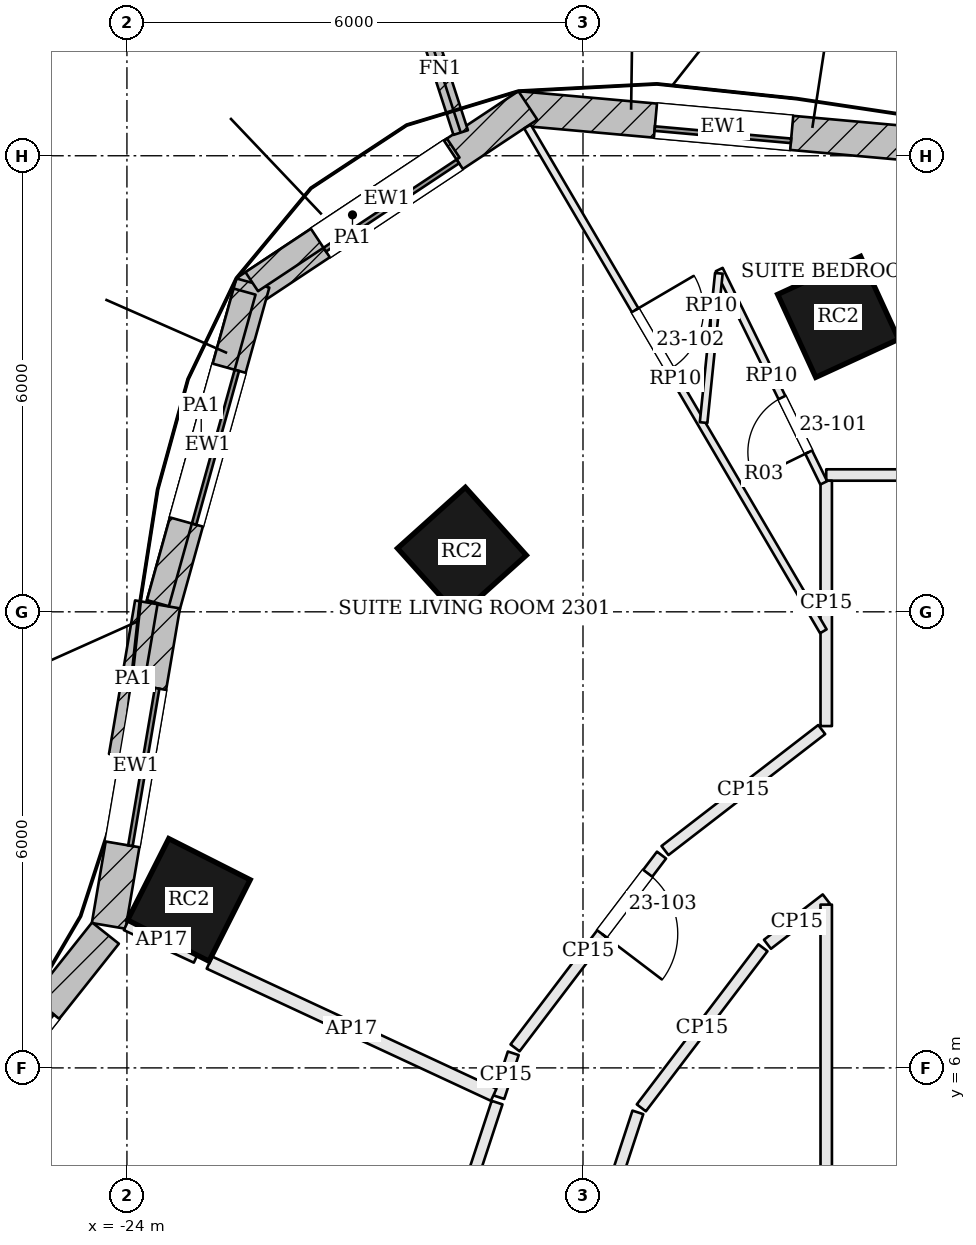
"""IFC4 building model, lengths in metres.
Left out: names, types, materials, properties, quantities, classifications, styles, units other than length and angle.
Written with IfcOpenShell. Run it as: python <this file> out.ifc"""

import sys

from ifc_helpers import new_model, si_unit, direction, frame, frame_2d, origin, origin_2d, place, context, subcontext, project, spatial, rectangle, extrude, element, fill, save


model = new_model("IFC4")
c1 = context("Model", 3, precision=1e-05, world=origin(), true_north=direction((0.0, 1.0)))
c2 = subcontext(c1, "Body", "Model", "MODEL_VIEW")
j1 = project(units=[si_unit("LENGTHUNIT", "METRE"), si_unit("PLANEANGLEUNIT", "RADIAN")], contexts=[c1])
p1 = place(None, origin())
s1 = spatial("IfcSite", under=j1, at=p1, CompositionType="ELEMENT")
p2 = place(p1, origin())
s2 = spatial("IfcBuilding", under=s1, at=p2, CompositionType="ELEMENT")
p3 = place(p2, frame((0.0, 0.0, 99.6)))
s3 = spatial("IfcBuildingStorey", under=s2, at=p3, CompositionType="ELEMENT", Elevation=99.6)
for number, where, z_axis, x_axis in (
    (1, (-14.643, 15.881, 0.0), (0.0, 0.0, 1.0), (-0.909, -0.417, 0.0)),
    (2, (-19.593, 12.79, 0.0), (0.0, 0.0, 1.0), (-0.744, -0.668, 0.0)),
    (3, (-23.185, 8.21, 0.0), (0.0, 0.0, 1.0), (-0.451, -0.893, 0.0)),
):
    element("IfcColumn", number, at=place(p3, frame(where, z_axis=z_axis, x_axis=x_axis)), inside=s3, PredefinedType="COLUMN", context=c2, shape_type="SweptSolid", body=[
        extrude(rectangle(XDim=1.2, YDim=1.2, at=origin_2d()), origin(), (0.0, 0.0, 1.0), 3.6),
    ])
p4 = place(p3, frame((-13.436, 18.138, 0.0), z_axis=(0.0, 0.0, 1.0), x_axis=(-0.99598810213, 0.089485755376, 0.0)))
e4 = element("IfcWall", 4, at=p4, inside=s3, PredefinedType="SOLIDWALL", context=c2, shape_type="SweptSolid", body=[
    extrude(rectangle(XDim=5.451, YDim=0.45, at=frame_2d((2.726, 0.0))), origin(), (0.0, 0.0, 1.0), 3.4),
])
p5 = place(p4, frame((1.825, 0.0, 0.9)))
e5 = element("IfcOpeningElement", 5, at=p5, cuts=e4, PredefinedType="OPENING", context=c2, shape_type="SweptSolid", body=[
    extrude(rectangle(XDim=1.8, YDim=2.0, at=frame_2d((0.9, 1.0))), frame((0.0, 0.235, 0.0), z_axis=(0.0, -1.0, 0.0), x_axis=(1.0, 0.0, 0.0)), (0.0, 0.0, 1.0), 0.47),
])
p6 = place(p3, frame((-18.726, 18.663, 0.0), z_axis=(0.0, 0.0, 1.0), x_axis=(-0.83333921474, -0.552761931736, 0.0)))
e6 = element("IfcWall", 6, at=p6, inside=s3, PredefinedType="SOLIDWALL", context=c2, shape_type="SweptSolid", body=[
    extrude(rectangle(XDim=4.451, YDim=0.45, at=frame_2d((2.225, 0.0))), origin(), (0.0, 0.0, 1.0), 3.4),
])
p7 = place(p6, frame((1.175, 0.0, 0.9)))
e7 = element("IfcOpeningElement", 7, at=p7, cuts=e6, PredefinedType="OPENING", context=c2, shape_type="SweptSolid", body=[
    extrude(rectangle(XDim=2.1, YDim=2.0, at=frame_2d((1.05, 1.0))), frame((0.0, 0.235, 0.0), z_axis=(0.0, -1.0, 0.0), x_axis=(1.0, 0.0, 0.0)), (0.0, 0.0, 1.0), 0.47),
])
p8 = place(p3, frame((-22.344, 16.326, 0.0), z_axis=(0.0, 0.0, 1.0), x_axis=(-0.267925456304, -0.963439645159, 0.0)))
e8 = element("IfcWall", 8, at=p8, inside=s3, PredefinedType="SOLIDWALL", context=c2, shape_type="SweptSolid", body=[
    extrude(rectangle(XDim=4.427, YDim=0.45, at=frame_2d((2.213, 0.0))), origin(), (0.0, 0.0, 1.0), 3.4),
])
p9 = place(p8, frame((1.164, 0.0, 0.9)))
e9 = element("IfcOpeningElement", 9, at=p9, cuts=e8, PredefinedType="OPENING", context=c2, shape_type="SweptSolid", body=[
    extrude(rectangle(XDim=2.1, YDim=2.0, at=frame_2d((1.05, 1.0))), frame((0.0, 0.235, 0.0), z_axis=(0.0, -1.0, 0.0), x_axis=(1.0, 0.0, 0.0)), (0.0, 0.0, 1.0), 0.47),
])
p10 = place(p3, frame((-23.524, 12.083, 0.0), z_axis=(0.0, 0.0, 1.0), x_axis=(-0.167445072349, -0.985881406532, 0.0)))
e10 = element("IfcWall", 10, at=p10, inside=s3, PredefinedType="SOLIDWALL", context=c2, shape_type="SweptSolid", body=[
    extrude(rectangle(XDim=4.275, YDim=0.45, at=frame_2d((2.137, 0.0))), origin(), (0.0, 0.0, 1.0), 3.4),
])
p11 = place(p10, frame((1.087, 0.0, 0.9)))
e11 = element("IfcOpeningElement", 11, at=p11, cuts=e10, PredefinedType="OPENING", context=c2, shape_type="SweptSolid", body=[
    extrude(rectangle(XDim=2.1, YDim=2.0, at=frame_2d((1.05, 1.0))), frame((0.0, 0.235, 0.0), z_axis=(0.0, -1.0, 0.0), x_axis=(1.0, 0.0, 0.0)), (0.0, 0.0, 1.0), 0.47),
])
p12 = place(p3, frame((-24.282, 7.774, 0.0), z_axis=(0.0, 0.0, 1.0), x_axis=(-0.621735490397, -0.783227285008, 0.0)))
e12 = element("IfcWall", 12, at=p12, inside=s3, PredefinedType="SOLIDWALL", context=c2, shape_type="SweptSolid", body=[
    extrude(rectangle(XDim=4.625, YDim=0.45, at=frame_2d((2.312, 0.0))), origin(), (0.0, 0.0, 1.0), 3.4),
])
p13 = place(p12, frame((1.262, 0.0, 0.9)))
e13 = element("IfcOpeningElement", 13, at=p13, cuts=e12, PredefinedType="OPENING", context=c2, shape_type="SweptSolid", body=[
    extrude(rectangle(XDim=2.1, YDim=2.0, at=frame_2d((1.05, 1.0))), frame((0.0, 0.235, 0.0), z_axis=(0.0, -1.0, 0.0), x_axis=(1.0, 0.0, 0.0)), (0.0, 0.0, 1.0), 0.47),
])
p14 = place(p3, frame((-19.609, 18.305, 0.0), z_axis=(0.0, 0.0, 1.0), x_axis=(-0.308600224758, 0.951191832008, 0.0)))
e14 = element("IfcWall", 14, at=p14, inside=s3, PredefinedType="SOLIDWALL", context=c2, shape_type="SweptSolid", body=[
    extrude(rectangle(XDim=1.75, YDim=0.2, at=frame_2d((0.875, 0.0))), origin(), (0.0, 0.0, 1.0), 3.4),
])
p15 = place(p3, frame((-19.708, 18.101, 3.6), z_axis=(0.0, 0.0, 1.0), x_axis=(-0.833370664286, -0.552714515738, 0.0)))
e15 = element("IfcWall", 15, at=p15, inside=s3, PredefinedType="PARAPET", context=c2, shape_type="SweptSolid", body=[
    extrude(rectangle(XDim=3.18, YDim=0.3, at=frame_2d((1.59, 0.0))), origin(), (0.0, 0.0, 1.0), 1.1),
])
p16 = place(p3, frame((-22.452, 16.213, 3.6), z_axis=(0.0, 0.0, 1.0), x_axis=(-0.267993020858, -0.963420853403, 0.0)))
e16 = element("IfcWall", 16, at=p16, inside=s3, PredefinedType="PARAPET", context=c2, shape_type="SweptSolid", body=[
    extrude(rectangle(XDim=4.255, YDim=0.3, at=frame_2d((2.128, 0.0))), origin(), (0.0, 0.0, 1.0), 1.1),
])
p17 = place(p3, frame((-23.745, 12.125, 3.6), z_axis=(0.0, 0.0, 1.0), x_axis=(-0.16743218322, -0.985883595574, 0.0)))
e17 = element("IfcWall", 17, at=p17, inside=s3, PredefinedType="PARAPET", context=c2, shape_type="SweptSolid", body=[
    extrude(rectangle(XDim=2.049, YDim=0.3, at=frame_2d((1.024, 0.0))), origin(), (0.0, 0.0, 1.0), 1.1),
])
p18 = place(p3, frame((-12.018, 13.8, 0.0), z_axis=(0.0, 0.0, 1.0), x_axis=(-1.0, 0.0, 0.0)))
e18 = element("IfcWall", 18, at=p18, inside=s3, PredefinedType="PARTITIONING", context=c2, shape_type="SweptSolid", body=[
    extrude(rectangle(XDim=2.782, YDim=0.15, at=frame_2d((1.391, 0.0))), origin(), (0.0, 0.0, 1.0), 2.784),
])
p19 = place(p3, frame((-14.8, 13.725, 0.0), z_axis=(0.0, 0.0, 1.0), x_axis=(0.0, -1.0, 0.0)))
e19 = element("IfcWall", 19, at=p19, inside=s3, PredefinedType="PARTITIONING", context=c2, shape_type="SweptSolid", body=[
    extrude(rectangle(XDim=3.228, YDim=0.15, at=frame_2d((1.614, 0.0))), origin(), (0.0, 0.0, 1.0), 2.784),
])
p20 = place(p3, frame((-14.86, 10.451, 0.0), z_axis=(0.0, 0.0, 1.0), x_axis=(-0.791542595332, -0.611113999001, 0.0)))
e20 = element("IfcWall", 20, at=p20, inside=s3, PredefinedType="PARTITIONING", context=c2, shape_type="SweptSolid", body=[
    extrude(rectangle(XDim=2.605, YDim=0.15, at=frame_2d((1.302, 0.0))), origin(), (0.0, 0.0, 1.0), 2.784),
])
p21 = place(p3, frame((-16.967, 8.8, 0.0), z_axis=(0.0, 0.0, 1.0), x_axis=(-0.604991921991, -0.796231608469, 0.0)))
e21 = element("IfcWall", 21, at=p21, inside=s3, PredefinedType="PARTITIONING", context=c2, shape_type="SweptSolid", body=[
    extrude(rectangle(XDim=3.185, YDim=0.15, at=frame_2d((1.593, 0.0))), origin(), (0.0, 0.0, 1.0), 2.784),
])
p22 = place(p21, frame((0.3, 0.0, 0.0)))
e22 = element("IfcOpeningElement", 22, at=p22, cuts=e21, PredefinedType="OPENING", context=c2, shape_type="SweptSolid", body=[
    extrude(rectangle(XDim=1.0, YDim=2.1, at=frame_2d((0.5, 1.05))), frame((0.0, 0.085, 0.0), z_axis=(0.0, -1.0, 0.0), x_axis=(1.0, 0.0, 0.0)), (0.0, 0.0, 1.0), 0.17),
])
p23 = place(p3, frame((-18.917, 6.192, 0.0), z_axis=(0.0, 0.0, 1.0), x_axis=(-0.312127391281, -0.95004025789, 0.0)))
e23 = element("IfcWall", 23, at=p23, inside=s3, PredefinedType="PARTITIONING", context=c2, shape_type="SweptSolid", body=[
    extrude(rectangle(XDim=0.608, YDim=0.15, at=frame_2d((0.304, 0.0))), origin(), (0.0, 0.0, 1.0), 2.784),
])
p24 = place(p3, frame((-24.004, 7.892, 0.0), z_axis=(0.0, 0.0, 1.0), x_axis=(0.906808768869, -0.421542235966, 0.0)))
e24 = element("IfcWall", 24, at=p24, inside=s3, PredefinedType="PARTITIONING", context=c2, shape_type="SweptSolid", body=[
    extrude(rectangle(XDim=1.015, YDim=0.175, at=frame_2d((0.508, 0.0))), origin(), (0.0, 0.0, 1.0), 2.784),
])
p25 = place(p3, frame((-22.914, 7.385, 0.0), z_axis=(0.0, 0.0, 1.0), x_axis=(0.906751124929, -0.421666215674, 0.0)))
e25 = element("IfcWall", 25, at=p25, inside=s3, PredefinedType="PARTITIONING", context=c2, shape_type="SweptSolid", body=[
    extrude(rectangle(XDim=4.123, YDim=0.175, at=frame_2d((2.062, 0.0))), origin(), (0.0, 0.0, 1.0), 2.784),
])
p26 = place(p3, frame((-19.13, 5.543, 0.0), z_axis=(0.0, 0.0, 1.0), x_axis=(-0.312063251121, -0.950061328178, 0.0)))
e26 = element("IfcWall", 26, at=p26, inside=s3, PredefinedType="PARTITIONING", context=c2, shape_type="SweptSolid", body=[
    extrude(rectangle(XDim=2.587, YDim=0.15, at=frame_2d((1.293, 0.0))), origin(), (0.0, 0.0, 1.0), 2.784),
])
p27 = place(p3, frame((-18.134, 2.809, 0.0), z_axis=(0.0, 0.0, 1.0), x_axis=(0.312005223814, 0.950080386237, 0.0)))
e27 = element("IfcWall", 27, at=p27, inside=s3, PredefinedType="PARTITIONING", context=c2, shape_type="SweptSolid", body=[
    extrude(rectangle(XDim=2.743, YDim=0.15, at=frame_2d((1.371, 0.0))), origin(), (0.0, 0.0, 1.0), 2.784),
])
p28 = place(p3, frame((-17.233, 5.475, 0.0), z_axis=(0.0, 0.0, 1.0), x_axis=(0.605024750549, 0.796206663639, 0.0)))
e28 = element("IfcWall", 28, at=p28, inside=s3, PredefinedType="PARTITIONING", context=c2, shape_type="SweptSolid", body=[
    extrude(rectangle(XDim=2.645, YDim=0.15, at=frame_2d((1.322, 0.0))), origin(), (0.0, 0.0, 1.0), 2.784),
])
p29 = place(p3, frame((-15.573, 7.626, 0.0), z_axis=(0.0, 0.0, 1.0), x_axis=(0.791581834002, 0.611063171921, 0.0)))
e29 = element("IfcWall", 29, at=p29, inside=s3, PredefinedType="PARTITIONING", context=c2, shape_type="SweptSolid", body=[
    extrude(rectangle(XDim=0.977, YDim=0.15, at=frame_2d((0.488, 0.0))), origin(), (0.0, 0.0, 1.0), 2.784),
])
p30 = place(p3, frame((-14.8, 8.148, 0.0), z_axis=(0.0, 0.0, 1.0), x_axis=(0.0, -1.0, 0.0)))
e30 = element("IfcWall", 30, at=p30, inside=s3, PredefinedType="PARTITIONING", context=c2, shape_type="SweptSolid", body=[
    extrude(rectangle(XDim=12.948, YDim=0.15, at=frame_2d((6.474, 0.0))), origin(), (0.0, 0.0, 1.0), 2.784),
])
p31 = place(p30, frame((5.536, 0.0, 0.0)))
e31 = element("IfcOpeningElement", 31, at=p31, cuts=e30, PredefinedType="OPENING", context=c2, shape_type="SweptSolid", body=[
    extrude(rectangle(XDim=1.8, YDim=2.1, at=frame_2d((0.9, 1.05))), frame((0.0, 0.085, 0.0), z_axis=(0.0, -1.0, 0.0), x_axis=(1.0, 0.0, 0.0)), (0.0, 0.0, 1.0), 0.17),
])
p32 = place(p3, frame((-18.73, 18.384, 0.0), z_axis=(0.0, 0.0, 1.0), x_axis=(0.505731710935, -0.862690811679, 0.0)))
e32 = element("IfcWall", 32, at=p32, inside=s3, PredefinedType="PARTITIONING", context=c2, shape_type="SweptSolid", body=[
    extrude(rectangle(XDim=7.697, YDim=0.1, at=frame_2d((3.848, 0.0))), origin(), (0.0, 0.0, 1.0), 2.784),
])
p33 = place(p32, frame((2.8, 0.0, 0.0)))
e33 = element("IfcOpeningElement", 33, at=p33, cuts=e32, PredefinedType="OPENING", context=c2, shape_type="SweptSolid", body=[
    extrude(rectangle(XDim=0.9, YDim=2.4, at=frame_2d((0.45, 1.2))), frame((0.0, 0.06, 0.0), z_axis=(0.0, -1.0, 0.0), x_axis=(1.0, 0.0, 0.0)), (0.0, 0.0, 1.0), 0.12),
])
p34 = place(p3, frame((-14.833, 13.697, 0.0), z_axis=(0.0, 0.0, 1.0), x_axis=(-0.439854589446, 0.898069006337, 0.0)))
e34 = element("IfcWall", 34, at=p34, inside=s3, PredefinedType="PARTITIONING", context=c2, shape_type="SweptSolid", body=[
    extrude(rectangle(XDim=3.125, YDim=0.1, at=frame_2d((1.562, 0.0))), origin(), (0.0, 0.0, 1.0), 2.784),
])
p35 = place(p34, frame((0.45, 0.0, 0.0)))
e35 = element("IfcOpeningElement", 35, at=p35, cuts=e34, PredefinedType="OPENING", context=c2, shape_type="SweptSolid", body=[
    extrude(rectangle(XDim=0.8, YDim=2.1, at=frame_2d((0.4, 1.05))), frame((0.0, 0.06, 0.0), z_axis=(0.0, -1.0, 0.0), x_axis=(1.0, 0.0, 0.0)), (0.0, 0.0, 1.0), 0.12),
])
p36 = place(p3, frame((-16.213, 16.453, 0.0), z_axis=(0.0, 0.0, 1.0), x_axis=(-0.101658565937, -0.99481934841, 0.0)))
e36 = element("IfcWall", 36, at=p36, inside=s3, PredefinedType="PARTITIONING", context=c2, shape_type="SweptSolid", body=[
    extrude(rectangle(XDim=1.974, YDim=0.1, at=frame_2d((0.987, 0.0))), origin(), (0.0, 0.0, 1.0), 2.784),
])
p37 = place(p5, origin())
e37 = element("IfcWindow", 37, at=p37, inside=s3, PartitioningType="SINGLE_PANEL", PredefinedType="WINDOW", context=c2, shape_type="SweptSolid", body=[
    extrude(rectangle(XDim=1.8, YDim=2.0, at=frame_2d((0.9, 1.0))), frame((0.0, 0.135, 0.0), z_axis=(0.0, -1.0, 0.0), x_axis=(1.0, 0.0, 0.0)), (0.0, 0.0, 1.0), 0.06),
])
fill(e5, e37)
p38 = place(p7, origin())
e38 = element("IfcWindow", 38, at=p38, inside=s3, PartitioningType="SINGLE_PANEL", PredefinedType="WINDOW", context=c2, shape_type="SweptSolid", body=[
    extrude(rectangle(XDim=2.1, YDim=2.0, at=frame_2d((1.05, 1.0))), frame((0.0, 0.135, 0.0), z_axis=(0.0, -1.0, 0.0), x_axis=(1.0, 0.0, 0.0)), (0.0, 0.0, 1.0), 0.06),
])
fill(e7, e38)
p39 = place(p9, origin())
e39 = element("IfcWindow", 39, at=p39, inside=s3, PartitioningType="SINGLE_PANEL", PredefinedType="WINDOW", context=c2, shape_type="SweptSolid", body=[
    extrude(rectangle(XDim=2.1, YDim=2.0, at=frame_2d((1.05, 1.0))), frame((0.0, 0.135, 0.0), z_axis=(0.0, -1.0, 0.0), x_axis=(1.0, 0.0, 0.0)), (0.0, 0.0, 1.0), 0.06),
])
fill(e9, e39)
p40 = place(p11, origin())
e40 = element("IfcWindow", 40, at=p40, inside=s3, PartitioningType="SINGLE_PANEL", PredefinedType="WINDOW", context=c2, shape_type="SweptSolid", body=[
    extrude(rectangle(XDim=2.1, YDim=2.0, at=frame_2d((1.05, 1.0))), frame((0.0, 0.135, 0.0), z_axis=(0.0, -1.0, 0.0), x_axis=(1.0, 0.0, 0.0)), (0.0, 0.0, 1.0), 0.06),
])
fill(e11, e40)
p41 = place(p13, origin())
e41 = element("IfcWindow", 41, at=p41, inside=s3, PartitioningType="SINGLE_PANEL", PredefinedType="WINDOW", context=c2, shape_type="SweptSolid", body=[
    extrude(rectangle(XDim=2.1, YDim=2.0, at=frame_2d((1.05, 1.0))), frame((0.0, 0.135, 0.0), z_axis=(0.0, -1.0, 0.0), x_axis=(1.0, 0.0, 0.0)), (0.0, 0.0, 1.0), 0.06),
])
fill(e13, e41)
p42 = place(p35, origin())
e42 = element("IfcDoor", 42, at=p42, inside=s3, OperationType="SINGLE_SWING_LEFT", PredefinedType="DOOR", context=c2, shape_type="SweptSolid", body=[
    extrude(rectangle(XDim=0.8, YDim=2.1, at=frame_2d((0.4, 1.05))), frame((0.0, 0.025, 0.0), z_axis=(0.0, -1.0, 0.0), x_axis=(1.0, 0.0, 0.0)), (0.0, 0.0, 1.0), 0.05),
])
fill(e35, e42)
p43 = place(p33, origin())
e43 = element("IfcDoor", 43, at=p43, inside=s3, OperationType="SINGLE_SWING_LEFT", PredefinedType="DOOR", context=c2, shape_type="SweptSolid", body=[
    extrude(rectangle(XDim=0.9, YDim=2.4, at=frame_2d((0.45, 1.2))), frame((0.0, 0.025, 0.0), z_axis=(0.0, -1.0, 0.0), x_axis=(1.0, 0.0, 0.0)), (0.0, 0.0, 1.0), 0.05),
])
fill(e33, e43)
p44 = place(p22, origin())
e44 = element("IfcDoor", 44, at=p44, inside=s3, OperationType="SINGLE_SWING_RIGHT", PredefinedType="DOOR", context=c2, shape_type="SweptSolid", body=[
    extrude(rectangle(XDim=1.0, YDim=2.1, at=frame_2d((0.5, 1.05))), frame((0.0, 0.025, 0.0), z_axis=(0.0, -1.0, 0.0), x_axis=(1.0, 0.0, 0.0)), (0.0, 0.0, 1.0), 0.05),
])
fill(e22, e44)
save(model, sys.argv[1])
